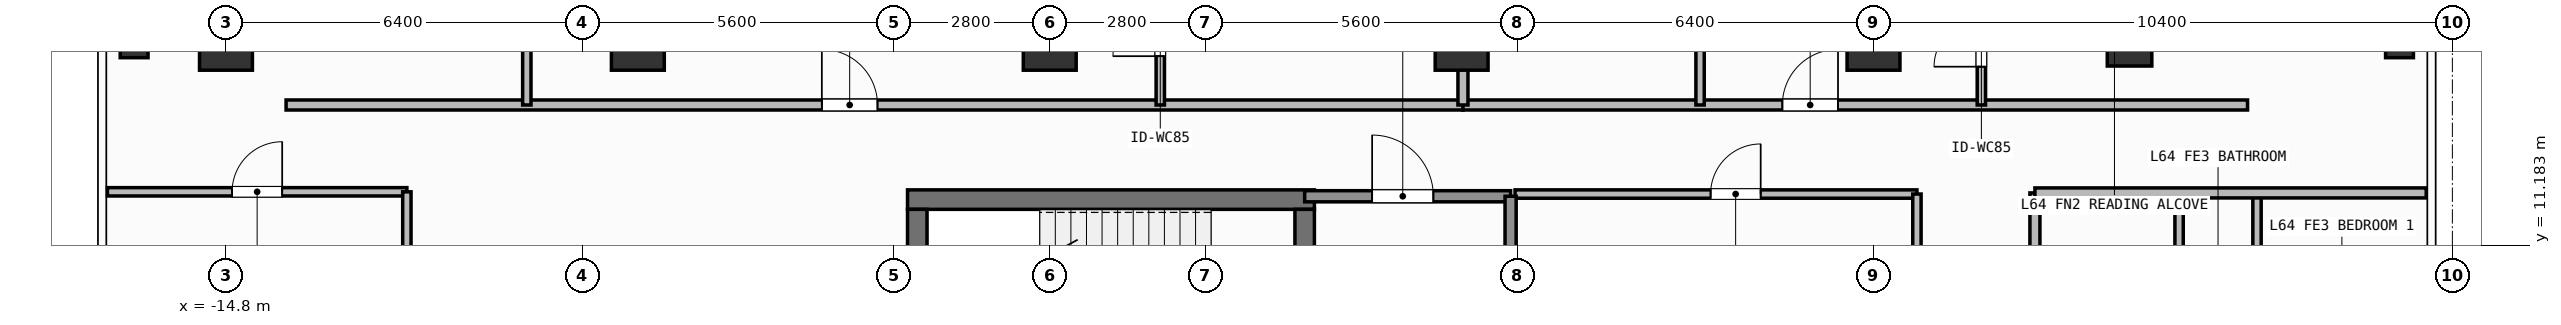
"""IFC4 building model, lengths in metres.
Left out: names, types, materials, properties, quantities, classifications, styles, units other than length and angle.
Written with IfcOpenShell. Run it as: python <this file> out.ifc"""

import sys

from ifc_helpers import new_model, si_unit, direction, frame, frame_2d, origin, origin_2d, place, context, subcontext, project, spatial, rectangle, hollow_rectangle, extrude, element, fill, save


model = new_model("IFC4")
c1 = context("Model", 3, precision=1e-05, world=origin(), true_north=direction((0.0, 1.0)))
c2 = subcontext(c1, "Body", "Model", "MODEL_VIEW")
j1 = project(units=[si_unit("LENGTHUNIT", "METRE"), si_unit("PLANEANGLEUNIT", "RADIAN")], contexts=[c1])
p1 = place(None, origin())
s1 = spatial("IfcSite", under=j1, at=p1, CompositionType="ELEMENT")
p2 = place(p1, origin())
s2 = spatial("IfcBuilding", under=s1, at=p2, CompositionType="ELEMENT")
p3 = place(p2, frame((0.0, 0.0, 262.5)))
s3 = spatial("IfcBuildingStorey", under=s2, at=p3, CompositionType="ELEMENT", Elevation=262.5)
p4 = place(p3, frame((-2.555, 12.0, 0.0), z_axis=(0.0, 0.0, 1.0), x_axis=(1.0, 0.0, 0.0)))
e1 = element("IfcWall", 1, at=p4, inside=s3, PredefinedType="SHEAR", context=c2, shape_type="SweptSolid", body=[
    extrude(rectangle(XDim=7.31, YDim=0.35, at=frame_2d((3.655, 0.0))), origin(), (0.0, 0.0, 1.0), 3.9),
])
p5 = place(p3, frame((-2.38, 8.9, 0.0), z_axis=(0.0, 0.0, 1.0), x_axis=(0.0, 1.0, 0.0)))
e2 = element("IfcWall", 2, at=p5, inside=s3, PredefinedType="SHEAR", context=c2, shape_type="SweptSolid", body=[
    extrude(rectangle(XDim=2.925, YDim=0.35, at=frame_2d((1.462, 0.0))), origin(), (0.0, 0.0, 1.0), 3.9),
])
p6 = place(p3, frame((4.58, 11.825, 0.0), z_axis=(0.0, 0.0, 1.0), x_axis=(0.0, -1.0, 0.0)))
e3 = element("IfcWall", 3, at=p6, inside=s3, PredefinedType="SHEAR", context=c2, shape_type="SweptSolid", body=[
    extrude(rectangle(XDim=2.925, YDim=0.35, at=frame_2d((1.462, 0.0))), origin(), (0.0, 0.0, 1.0), 3.9),
])
p7 = place(p6, frame((0.913, 0.0, 0.0)))
e4 = element("IfcOpeningElement", 4, at=p7, cuts=e3, PredefinedType="OPENING", context=c2, shape_type="SweptSolid", body=[
    extrude(rectangle(XDim=1.1, YDim=2.15, at=frame_2d((0.55, 1.075))), frame((0.0, 0.185, 0.0), z_axis=(0.0, -1.0, 0.0), x_axis=(1.0, 0.0, 0.0)), (0.0, 0.0, 1.0), 0.37),
])
for number, where, z_axis, x_axis in (
    (5, (-14.8, 14.8, 0.0), (0.0, 0.0, 1.0), (1.0, 0.0, 0.0)),
    (6, (-7.4, 14.8, 0.0), (0.0, 0.0, 1.0), (1.0, 0.0, 0.0)),
    (7, (0.0, 14.8, 0.0), (0.0, 0.0, 1.0), (1.0, 0.0, 0.0)),
    (8, (7.4, 14.8, 0.0), (0.0, 0.0, 1.0), (1.0, 0.0, 0.0)),
    (9, (14.8, 14.8, 0.0), (0.0, 0.0, 1.0), (1.0, 0.0, 0.0)),
):
    element("IfcColumn", number, at=place(p3, frame(where, z_axis=z_axis, x_axis=x_axis)), inside=s3, PredefinedType="COLUMN", context=c2, shape_type="SweptSolid", body=[
        extrude(rectangle(XDim=0.95, YDim=0.95, at=origin_2d()), origin(), (0.0, 0.0, 1.0), 3.9),
    ])
p8 = place(p3, frame((19.4, 14.8, 0.0), z_axis=(0.0, 0.0, 1.0), x_axis=(1.0, 0.0, 0.0)))
e10 = element("IfcColumn", 10, at=p8, inside=s3, PredefinedType="COLUMN", context=c2, shape_type="SweptSolid", body=[
    extrude(hollow_rectangle(XDim=0.8, YDim=0.8, WallThickness=0.036, at=origin_2d()), origin(), (0.0, 0.0, 1.0), 3.9),
])
for number, where, z_axis, x_axis in (
    (11, (-16.45, 14.8, 0.0), (0.0, 0.0, 1.0), (1.0, 0.0, 0.0)),
    (12, (24.25, 14.8, 0.0), (0.0, 0.0, 1.0), (1.0, 0.0, 0.0)),
):
    element("IfcColumn", number, at=place(p3, frame(where, z_axis=z_axis, x_axis=x_axis)), inside=s3, PredefinedType="COLUMN", context=c2, shape_type="SweptSolid", body=[
        extrude(hollow_rectangle(XDim=0.5, YDim=0.5, WallThickness=0.025, at=origin_2d()), origin(), (0.0, 0.0, 1.0), 3.9),
    ])
p9 = place(p3, frame((4.58, 12.06, 0.0), z_axis=(0.0, 0.0, 1.0), x_axis=(1.0, 0.0, 0.0)))
e13 = element("IfcWall", 13, at=p9, inside=s3, PredefinedType="SOLIDWALL", context=c2, shape_type="SweptSolid", body=[
    extrude(rectangle(XDim=3.7, YDim=0.2, at=frame_2d((1.85, 0.0))), origin(), (0.0, 0.0, 1.0), 3.68),
])
p10 = place(p9, frame((1.212, 0.0, 0.0)))
e14 = element("IfcOpeningElement", 14, at=p10, cuts=e13, PredefinedType="OPENING", context=c2, shape_type="SweptSolid", body=[
    extrude(rectangle(XDim=1.1, YDim=2.15, at=frame_2d((0.55, 1.075))), frame((0.0, 0.11, 0.0), z_axis=(0.0, -1.0, 0.0), x_axis=(1.0, 0.0, 0.0)), (0.0, 0.0, 1.0), 0.22),
])
p11 = place(p3, frame((8.36, 12.1, 0.0), z_axis=(0.0, 0.0, 1.0), x_axis=(1.0, 0.0, 0.0)))
e15 = element("IfcWall", 15, at=p11, inside=s3, PredefinedType="PARTITIONING", context=c2, shape_type="SweptSolid", body=[
    extrude(rectangle(XDim=7.22, YDim=0.15, at=frame_2d((3.61, 0.0))), origin(), (0.0, 0.0, 1.0), 3.68),
])
p12 = place(p11, frame((3.513, 0.0, 0.0)))
e16 = element("IfcOpeningElement", 16, at=p12, cuts=e15, PredefinedType="OPENING", context=c2, shape_type="SweptSolid", body=[
    extrude(rectangle(XDim=0.9, YDim=2.1, at=frame_2d((0.45, 1.05))), frame((0.0, 0.085, 0.0), z_axis=(0.0, -1.0, 0.0), x_axis=(1.0, 0.0, 0.0)), (0.0, 0.0, 1.0), 0.17),
])
p13 = place(p3, frame((-13.72, 13.7, 0.0), z_axis=(0.0, 0.0, 1.0), x_axis=(1.0, 0.0, 0.0)))
e17 = element("IfcWall", 17, at=p13, inside=s3, PredefinedType="PARTITIONING", context=c2, shape_type="SweptSolid", body=[
    extrude(rectangle(XDim=21.144, YDim=0.18, at=frame_2d((10.572, 0.0))), origin(), (0.0, 0.0, 1.0), 3.68),
])
p14 = place(p13, frame((9.625, 0.0, 0.0)))
e18 = element("IfcOpeningElement", 18, at=p14, cuts=e17, PredefinedType="OPENING", context=c2, shape_type="SweptSolid", body=[
    extrude(rectangle(XDim=1.0, YDim=2.2, at=frame_2d((0.5, 1.1))), frame((0.0, 0.1, 0.0), z_axis=(0.0, -1.0, 0.0), x_axis=(1.0, 0.0, 0.0)), (0.0, 0.0, 1.0), 0.2),
])
p15 = place(p3, frame((-9.395, 13.7, 0.0), z_axis=(0.0, 0.0, 1.0), x_axis=(0.0, 1.0, 0.0)))
e19 = element("IfcWall", 19, at=p15, inside=s3, PredefinedType="PARTITIONING", context=c2, shape_type="SweptSolid", body=[
    extrude(rectangle(XDim=4.213, YDim=0.15, at=frame_2d((2.106, 0.0))), origin(), (0.0, 0.0, 1.0), 3.68),
])
p16 = place(p15, frame((1.592, 0.0, 0.0)))
e20 = element("IfcOpeningElement", 20, at=p16, cuts=e19, PredefinedType="OPENING", context=c2, shape_type="SweptSolid", body=[
    extrude(rectangle(XDim=0.85, YDim=2.1, at=frame_2d((0.425, 1.05))), frame((0.0, 0.085, 0.0), z_axis=(0.0, -1.0, 0.0), x_axis=(1.0, 0.0, 0.0)), (0.0, 0.0, 1.0), 0.17),
])
p17 = place(p3, frame((1.986, 13.7, 0.0), z_axis=(0.0, 0.0, 1.0), x_axis=(0.0, 1.0, 0.0)))
e21 = element("IfcWall", 21, at=p17, inside=s3, PredefinedType="PARTITIONING", context=c2, shape_type="SweptSolid", body=[
    extrude(rectangle(XDim=2.604, YDim=0.15, at=frame_2d((1.302, 0.0))), origin(), (0.0, 0.0, 1.0), 3.68),
])
p18 = place(p17, frame((0.877, 0.0, 0.0)))
e22 = element("IfcOpeningElement", 22, at=p18, cuts=e21, PredefinedType="OPENING", context=c2, shape_type="SweptSolid", body=[
    extrude(rectangle(XDim=0.85, YDim=2.1, at=frame_2d((0.425, 1.05))), frame((0.0, 0.085, 0.0), z_axis=(0.0, -1.0, 0.0), x_axis=(1.0, 0.0, 0.0)), (0.0, 0.0, 1.0), 0.17),
])
p19 = place(p3, frame((7.424, 13.7, 0.0), z_axis=(0.0, 0.0, 1.0), x_axis=(1.0, 0.0, 0.0)))
e23 = element("IfcWall", 23, at=p19, inside=s3, PredefinedType="PARTITIONING", context=c2, shape_type="SweptSolid", body=[
    extrude(rectangle(XDim=14.096, YDim=0.18, at=frame_2d((7.048, 0.0))), origin(), (0.0, 0.0, 1.0), 3.68),
])
p20 = place(p19, frame((5.738, 0.0, 0.0)))
e24 = element("IfcOpeningElement", 24, at=p20, cuts=e23, PredefinedType="OPENING", context=c2, shape_type="SweptSolid", body=[
    extrude(rectangle(XDim=1.0, YDim=2.2, at=frame_2d((0.5, 1.1))), frame((0.0, 0.1, 0.0), z_axis=(0.0, -1.0, 0.0), x_axis=(1.0, 0.0, 0.0)), (0.0, 0.0, 1.0), 0.2),
])
p21 = place(p3, frame((11.684, 13.7, 0.0), z_axis=(0.0, 0.0, 1.0), x_axis=(0.0, 1.0, 0.0)))
e25 = element("IfcWall", 25, at=p21, inside=s3, PredefinedType="PARTITIONING", context=c2, shape_type="SweptSolid", body=[
    extrude(rectangle(XDim=4.29, YDim=0.15, at=frame_2d((2.145, 0.0))), origin(), (0.0, 0.0, 1.0), 3.68),
])
p22 = place(p21, frame((1.72, 0.0, 0.0)))
e26 = element("IfcOpeningElement", 26, at=p22, cuts=e25, PredefinedType="OPENING", context=c2, shape_type="SweptSolid", body=[
    extrude(rectangle(XDim=0.85, YDim=2.1, at=frame_2d((0.425, 1.05))), frame((0.0, 0.085, 0.0), z_axis=(0.0, -1.0, 0.0), x_axis=(1.0, 0.0, 0.0)), (0.0, 0.0, 1.0), 0.17),
])
p23 = place(p3, frame((16.738, 13.7, 0.0), z_axis=(0.0, 0.0, 1.0), x_axis=(0.0, 1.0, 0.0)))
e27 = element("IfcWall", 27, at=p23, inside=s3, PredefinedType="PARTITIONING", context=c2, shape_type="SweptSolid", body=[
    extrude(rectangle(XDim=2.402, YDim=0.15, at=frame_2d((1.201, 0.0))), origin(), (0.0, 0.0, 1.0), 3.68),
])
p24 = place(p23, frame((0.688, 0.0, 0.0)))
e28 = element("IfcOpeningElement", 28, at=p24, cuts=e27, PredefinedType="OPENING", context=c2, shape_type="SweptSolid", body=[
    extrude(rectangle(XDim=0.85, YDim=2.1, at=frame_2d((0.425, 1.05))), frame((0.0, 0.085, 0.0), z_axis=(0.0, -1.0, 0.0), x_axis=(1.0, 0.0, 0.0)), (0.0, 0.0, 1.0), 0.17),
])
p25 = place(p3, frame((-16.93, 12.14, 0.0), z_axis=(0.0, 0.0, 1.0), x_axis=(1.0, 0.0, 0.0)))
e29 = element("IfcWall", 29, at=p25, inside=s3, PredefinedType="PARTITIONING", context=c2, shape_type="SweptSolid", body=[
    extrude(rectangle(XDim=5.38, YDim=0.15, at=frame_2d((2.69, 0.0))), origin(), (0.0, 0.0, 1.0), 3.68),
])
p26 = place(p25, frame((2.24, 0.0, 0.0)))
e30 = element("IfcOpeningElement", 30, at=p26, cuts=e29, PredefinedType="OPENING", context=c2, shape_type="SweptSolid", body=[
    extrude(rectangle(XDim=0.9, YDim=2.1, at=frame_2d((0.45, 1.05))), frame((0.0, 0.085, 0.0), z_axis=(0.0, -1.0, 0.0), x_axis=(1.0, 0.0, 0.0)), (0.0, 0.0, 1.0), 0.17),
])
p27 = place(p3, frame((17.7, 4.04, 0.0), z_axis=(0.0, 0.0, 1.0), x_axis=(0.0, 1.0, 0.0)))
e31 = element("IfcWall", 31, at=p27, inside=s3, PredefinedType="PARTITIONING", context=c2, shape_type="SweptSolid", body=[
    extrude(rectangle(XDim=8.08, YDim=0.18, at=frame_2d((4.04, 0.0))), origin(), (0.0, 0.0, 1.0), 3.68),
])
p28 = place(p27, frame((1.761, 0.0, 0.0)))
e32 = element("IfcOpeningElement", 32, at=p28, cuts=e31, PredefinedType="OPENING", context=c2, shape_type="SweptSolid", body=[
    extrude(rectangle(XDim=1.0, YDim=2.2, at=frame_2d((0.5, 1.1))), frame((0.0, 0.1, 0.0), z_axis=(0.0, -1.0, 0.0), x_axis=(1.0, 0.0, 0.0)), (0.0, 0.0, 1.0), 0.2),
])
p29 = place(p3, frame((8.28, 8.725, 0.0), z_axis=(0.0, 0.0, 1.0), x_axis=(0.0, 1.0, 0.0)))
e33 = element("IfcWall", 33, at=p29, inside=s3, PredefinedType="SOLIDWALL", context=c2, shape_type="SweptSolid", body=[
    extrude(rectangle(XDim=3.335, YDim=0.2, at=frame_2d((1.667, 0.0))), origin(), (0.0, 0.0, 1.0), 3.68),
])
p30 = place(p3, frame((15.58, 5.85, 0.0), z_axis=(0.0, 0.0, 1.0), x_axis=(0.0, 1.0, 0.0)))
e34 = element("IfcWall", 34, at=p30, inside=s3, PredefinedType="PARTITIONING", context=c2, shape_type="SweptSolid", body=[
    extrude(rectangle(XDim=6.25, YDim=0.15, at=frame_2d((3.125, 0.0))), origin(), (0.0, 0.0, 1.0), 3.68),
])
p31 = place(p3, frame((7.424, 13.7, 0.0), z_axis=(0.0, 0.0, 1.0), x_axis=(0.0, 1.0, 0.0)))
e35 = element("IfcWall", 35, at=p31, inside=s3, PredefinedType="PARTITIONING", context=c2, shape_type="SweptSolid", body=[
    extrude(rectangle(XDim=7.33, YDim=0.18, at=frame_2d((3.665, 0.0))), origin(), (0.0, 0.0, 1.0), 3.182),
])
p32 = place(p3, frame((-11.55, 2.95, 0.0), z_axis=(0.0, 0.0, 1.0), x_axis=(0.0, 1.0, 0.0)))
e36 = element("IfcWall", 36, at=p32, inside=s3, PredefinedType="PARTITIONING", context=c2, shape_type="SweptSolid", body=[
    extrude(rectangle(XDim=9.19, YDim=0.15, at=frame_2d((4.595, 0.0))), origin(), (0.0, 0.0, 1.0), 3.68),
])
for number, where, z_axis, x_axis in (
    (37, (20.29, 8.505, 0.0), (0.0, 0.0, 1.0), (0.0, 1.0, 0.0)),
    (38, (21.69, 8.505, 0.0), (0.0, 0.0, 1.0), (0.0, 1.0, 0.0)),
):
    element("IfcWall", number, at=place(p3, frame(where, z_axis=z_axis, x_axis=x_axis)), inside=s3, PredefinedType="PARTITIONING", context=c2, shape_type="SweptSolid", body=[
        extrude(rectangle(XDim=3.615, YDim=0.15, at=frame_2d((1.808, 0.0))), origin(), (0.0, 0.0, 1.0), 3.68),
    ])
p33 = place(p3, frame((17.7, 12.12, 0.0), z_axis=(0.0, 0.0, 1.0), x_axis=(1.0, 0.0, 0.0)))
e39 = element("IfcWall", 39, at=p33, inside=s3, PredefinedType="PARTITIONING", context=c2, shape_type="SweptSolid", body=[
    extrude(rectangle(XDim=7.03, YDim=0.18, at=frame_2d((3.515, 0.0))), origin(), (0.0, 0.0, 1.0), 3.68),
])
p34 = place(p10, origin())
e40 = element("IfcDoor", 40, at=p34, inside=s3, OperationType="SINGLE_SWING_LEFT", PredefinedType="DOOR", context=c2, shape_type="SweptSolid", body=[
    extrude(rectangle(XDim=1.1, YDim=2.15, at=frame_2d((0.55, 1.075))), frame((0.0, 0.025, 0.0), z_axis=(0.0, -1.0, 0.0), x_axis=(1.0, 0.0, 0.0)), (0.0, 0.0, 1.0), 0.05),
])
fill(e14, e40)
p35 = place(p12, origin())
e41 = element("IfcDoor", 41, at=p35, inside=s3, OperationType="SINGLE_SWING_RIGHT", PredefinedType="DOOR", context=c2, shape_type="SweptSolid", body=[
    extrude(rectangle(XDim=0.9, YDim=2.1, at=frame_2d((0.45, 1.05))), frame((0.0, 0.025, 0.0), z_axis=(0.0, -1.0, 0.0), x_axis=(1.0, 0.0, 0.0)), (0.0, 0.0, 1.0), 0.05),
])
fill(e16, e41)
p36 = place(p14, origin())
e42 = element("IfcDoor", 42, at=p36, inside=s3, OperationType="SINGLE_SWING_LEFT", PredefinedType="DOOR", context=c2, shape_type="SweptSolid", body=[
    extrude(rectangle(XDim=1.0, YDim=2.2, at=frame_2d((0.5, 1.1))), frame((0.0, 0.025, 0.0), z_axis=(0.0, -1.0, 0.0), x_axis=(1.0, 0.0, 0.0)), (0.0, 0.0, 1.0), 0.05),
])
fill(e18, e42)
p37 = place(p18, origin())
e43 = element("IfcDoor", 43, at=p37, inside=s3, OperationType="SINGLE_SWING_LEFT", PredefinedType="DOOR", context=c2, shape_type="SweptSolid", body=[
    extrude(rectangle(XDim=0.85, YDim=2.1, at=frame_2d((0.425, 1.05))), frame((0.0, 0.025, 0.0), z_axis=(0.0, -1.0, 0.0), x_axis=(1.0, 0.0, 0.0)), (0.0, 0.0, 1.0), 0.05),
])
fill(e22, e43)
p38 = place(p20, origin())
e44 = element("IfcDoor", 44, at=p38, inside=s3, OperationType="SINGLE_SWING_RIGHT", PredefinedType="DOOR", context=c2, shape_type="SweptSolid", body=[
    extrude(rectangle(XDim=1.0, YDim=2.2, at=frame_2d((0.5, 1.1))), frame((0.0, 0.025, 0.0), z_axis=(0.0, -1.0, 0.0), x_axis=(1.0, 0.0, 0.0)), (0.0, 0.0, 1.0), 0.05),
])
fill(e24, e44)
p39 = place(p24, origin())
e45 = element("IfcDoor", 45, at=p39, inside=s3, OperationType="SINGLE_SWING_LEFT", PredefinedType="DOOR", context=c2, shape_type="SweptSolid", body=[
    extrude(rectangle(XDim=0.85, YDim=2.1, at=frame_2d((0.425, 1.05))), frame((0.0, 0.025, 0.0), z_axis=(0.0, -1.0, 0.0), x_axis=(1.0, 0.0, 0.0)), (0.0, 0.0, 1.0), 0.05),
])
fill(e28, e45)
p40 = place(p26, origin())
e46 = element("IfcDoor", 46, at=p40, inside=s3, OperationType="SINGLE_SWING_RIGHT", PredefinedType="DOOR", context=c2, shape_type="SweptSolid", body=[
    extrude(rectangle(XDim=0.9, YDim=2.1, at=frame_2d((0.45, 1.05))), frame((0.0, 0.025, 0.0), z_axis=(0.0, -1.0, 0.0), x_axis=(1.0, 0.0, 0.0)), (0.0, 0.0, 1.0), 0.05),
])
fill(e30, e46)
save(model, sys.argv[1])
